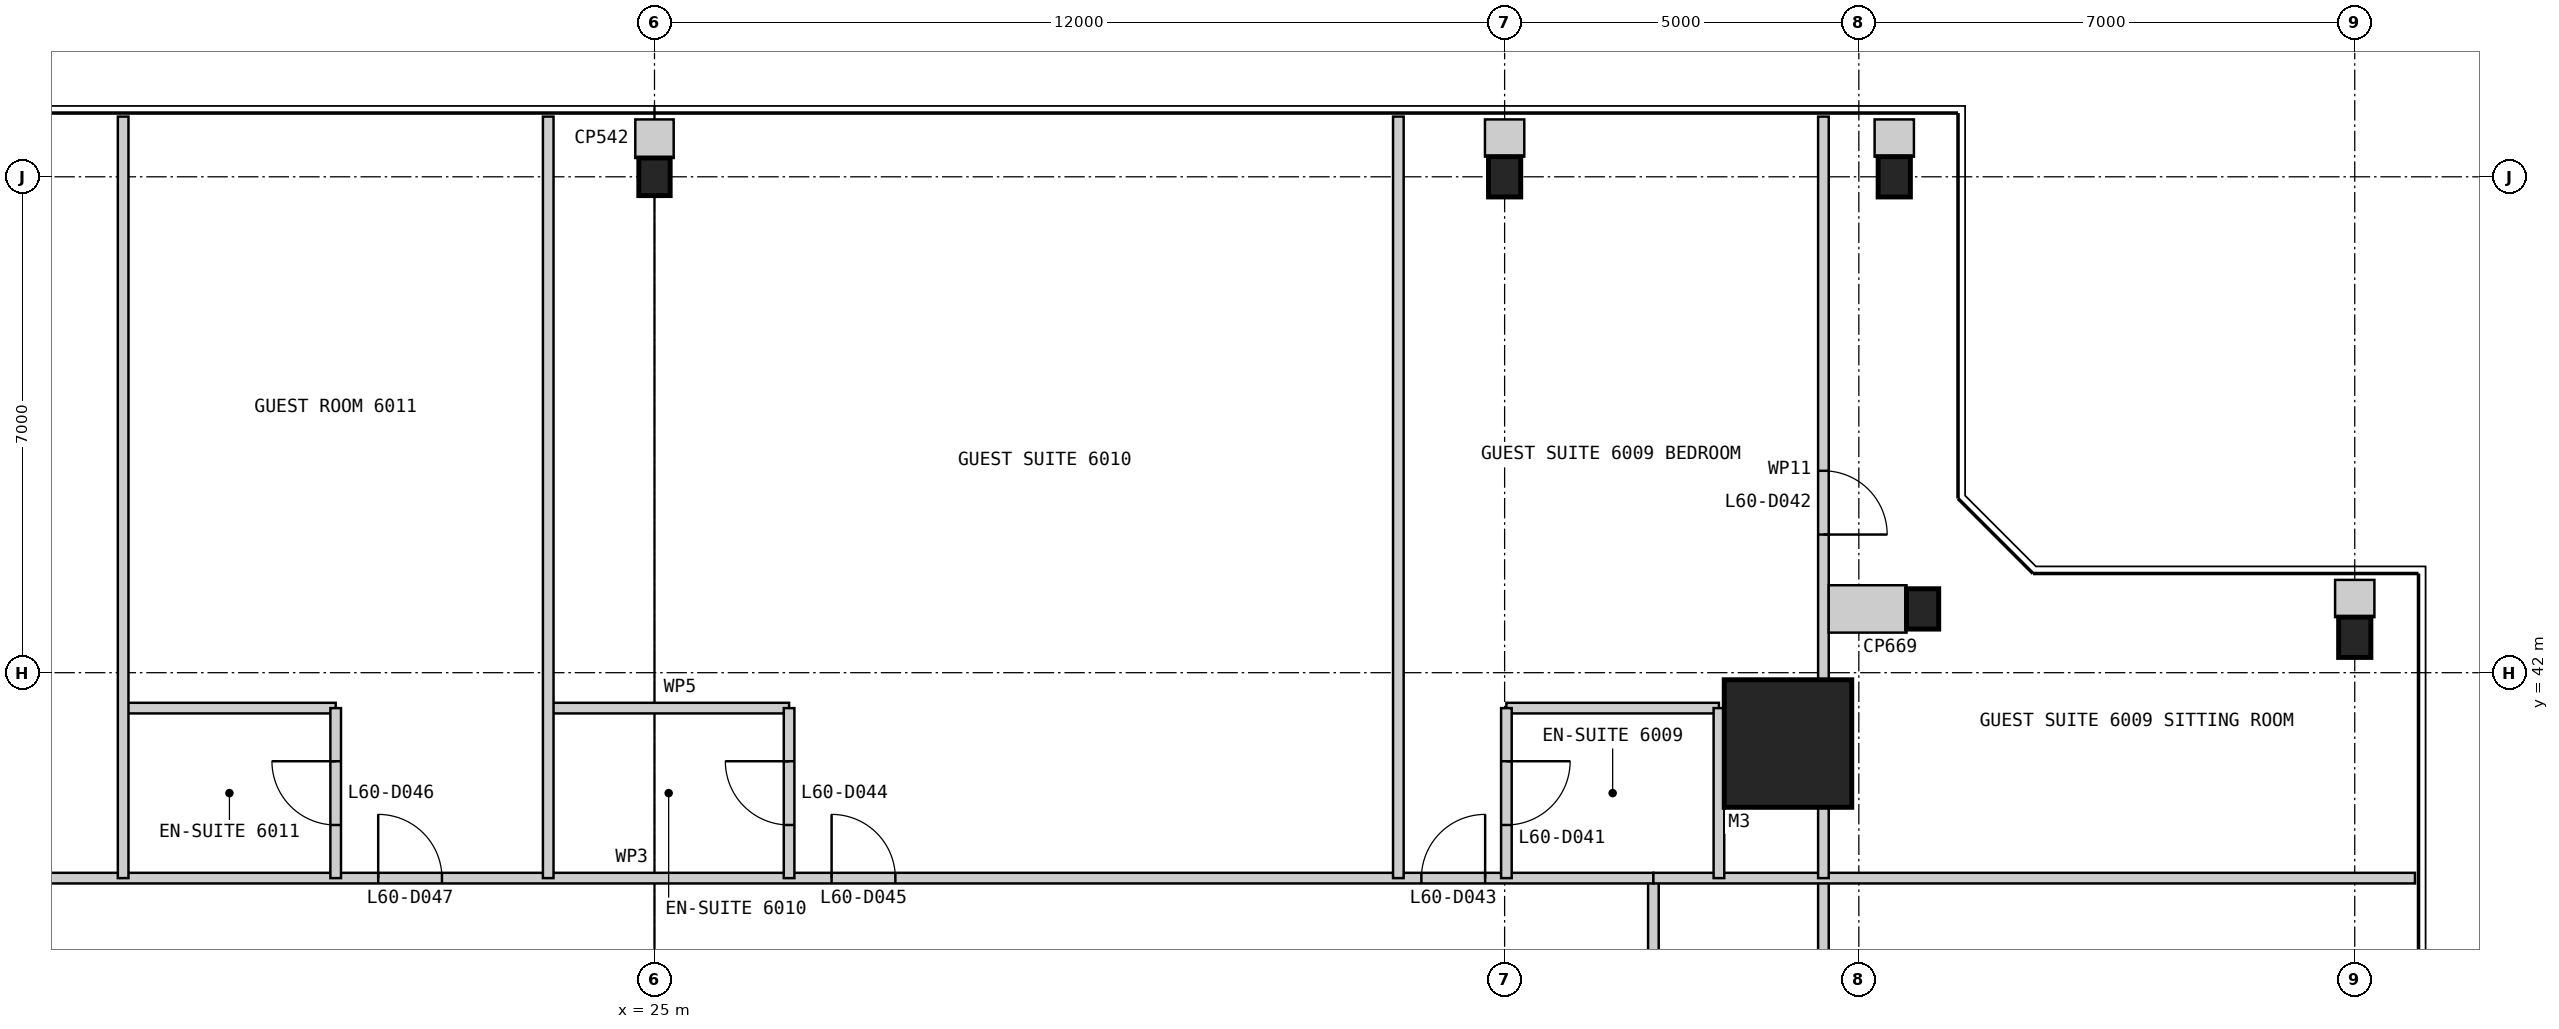
"""IFC4 building model, lengths in metres.
Left out: names, types, materials, properties, quantities, classifications, styles, units other than length and angle.
Written with IfcOpenShell. Run it as: python <this file> out.ifc"""

import sys

from ifc_helpers import new_model, si_unit, direction, frame, frame_2d, origin, origin_2d, place, context, subcontext, project, spatial, rectangle, i_section, extrude, element, fill, save


model = new_model("IFC4")
c1 = context("Model", 3, precision=1e-05, world=origin(), true_north=direction((0.0, 1.0)))
c2 = subcontext(c1, "Body", "Model", "MODEL_VIEW")
j1 = project(units=[si_unit("LENGTHUNIT", "METRE"), si_unit("PLANEANGLEUNIT", "RADIAN")], contexts=[c1])
p1 = place(None, origin())
s1 = spatial("IfcSite", under=j1, at=p1, CompositionType="ELEMENT")
p2 = place(p1, origin())
s2 = spatial("IfcBuilding", under=s1, at=p2, CompositionType="ELEMENT")
p3 = place(p2, frame((0.0, 0.0, 256.0)))
s3 = spatial("IfcBuildingStorey", under=s2, at=p3, CompositionType="ELEMENT", Elevation=256.0)
p4 = place(p3, frame((41.0, 41.0, 0.0), z_axis=(0.0, 0.0, 1.0), x_axis=(1.0, 0.0, 0.0)))
e1 = element("IfcColumn", 1, at=p4, inside=s3, PredefinedType="COLUMN", context=c2, shape_type="SweptSolid", body=[
    extrude(rectangle(XDim=1.8, YDim=1.8, at=origin_2d()), origin(), (0.0, 0.0, 1.0), 3.4),
])
for number, where, z_axis, x_axis in (
    (2, (49.0, 42.5, 0.0), (0.0, 0.0, 1.0), (1.0, 0.0, 0.0)),
    (3, (42.9, 42.9, 0.0), (0.0, 0.0, 1.0), (1.0, 0.0, 0.0)),
    (4, (42.5, 49.0, 0.0), (0.0, 0.0, 1.0), (1.0, 0.0, 0.0)),
    (5, (37.0, 49.0, 0.0), (0.0, 0.0, 1.0), (1.0, 0.0, 0.0)),
):
    element("IfcColumn", number, at=place(p3, frame(where, z_axis=z_axis, x_axis=x_axis)), inside=s3, PredefinedType="COLUMN", context=c2, shape_type="SweptSolid", body=[
        extrude(i_section(OverallWidth=0.455, OverallDepth=0.569, WebThickness=0.078, FlangeThickness=0.125, at=origin_2d()), origin(), (0.0, 0.0, 1.0), 3.4),
    ])
p5 = place(p3, frame((25.0, 49.0, 0.0), z_axis=(0.0, 0.0, 1.0), x_axis=(1.0, 0.0, 0.0)))
e6 = element("IfcColumn", 6, at=p5, inside=s3, PredefinedType="COLUMN", context=c2, shape_type="SweptSolid", body=[
    extrude(i_section(OverallWidth=0.442, OverallDepth=0.531, WebThickness=0.066, FlangeThickness=0.106, at=origin_2d()), origin(), (0.0, 0.0, 1.0), 3.4),
])
p6 = place(p3, frame((39.1, 10.9, 0.0), z_axis=(0.0, 0.0, 1.0), x_axis=(0.0, 1.0, 0.0)))
e7 = element("IfcWall", 7, at=p6, inside=s3, PredefinedType="PARTITIONING", context=c2, shape_type="SweptSolid", body=[
    extrude(rectangle(XDim=28.2, YDim=0.15, at=frame_2d((14.1, 0.0))), origin(), (0.0, 0.0, 1.0), 3.25),
])
p7 = place(p6, frame((2.375, 0.0, 0.0)))
e8 = element("IfcOpeningElement", 8, at=p7, cuts=e7, PredefinedType="OPENING", context=c2, shape_type="SweptSolid", body=[
    extrude(rectangle(XDim=0.9, YDim=2.1, at=frame_2d((0.45, 1.05))), frame((0.0, 0.085, 0.0), z_axis=(0.0, -1.0, 0.0), x_axis=(1.0, 0.0, 0.0)), (0.0, 0.0, 1.0), 0.17),
])
p8 = place(p6, frame((10.7, 0.0, 0.0)))
e9 = element("IfcOpeningElement", 9, at=p8, cuts=e7, PredefinedType="OPENING", context=c2, shape_type="SweptSolid", body=[
    extrude(rectangle(XDim=0.9, YDim=2.1, at=frame_2d((0.45, 1.05))), frame((0.0, 0.085, 0.0), z_axis=(0.0, -1.0, 0.0), x_axis=(1.0, 0.0, 0.0)), (0.0, 0.0, 1.0), 0.17),
])
p9 = place(p6, frame((17.1, 0.0, 0.0)))
e10 = element("IfcOpeningElement", 10, at=p9, cuts=e7, PredefinedType="OPENING", context=c2, shape_type="SweptSolid", body=[
    extrude(rectangle(XDim=0.9, YDim=2.1, at=frame_2d((0.45, 1.05))), frame((0.0, 0.085, 0.0), z_axis=(0.0, -1.0, 0.0), x_axis=(1.0, 0.0, 0.0)), (0.0, 0.0, 1.0), 0.17),
])
p10 = place(p6, frame((23.7, 0.0, 0.0)))
e11 = element("IfcOpeningElement", 11, at=p10, cuts=e7, PredefinedType="OPENING", context=c2, shape_type="SweptSolid", body=[
    extrude(rectangle(XDim=0.9, YDim=2.1, at=frame_2d((0.45, 1.05))), frame((0.0, 0.085, 0.0), z_axis=(0.0, -1.0, 0.0), x_axis=(1.0, 0.0, 0.0)), (0.0, 0.0, 1.0), 0.17),
])
p11 = place(p3, frame((41.5, 36.1, 0.0), z_axis=(0.0, 0.0, 1.0), x_axis=(0.0, 1.0, 0.0)))
e12 = element("IfcWall", 12, at=p11, inside=s3, PredefinedType="PARTITIONING", context=c2, shape_type="SweptSolid", body=[
    extrude(rectangle(XDim=3.0, YDim=0.15, at=frame_2d((1.5, 0.0))), origin(), (0.0, 0.0, 1.0), 3.25),
])
p12 = place(p3, frame((39.1, 39.1, 0.0), z_axis=(0.0, 0.0, 1.0), x_axis=(-1.0, 0.0, 0.0)))
e13 = element("IfcWall", 13, at=p12, inside=s3, PredefinedType="PARTITIONING", context=c2, shape_type="SweptSolid", body=[
    extrude(rectangle(XDim=28.2, YDim=0.15, at=frame_2d((14.1, 0.0))), origin(), (0.0, 0.0, 1.0), 3.25),
])
p13 = place(p12, frame((2.375, 0.0, 0.0)))
e14 = element("IfcOpeningElement", 14, at=p13, cuts=e13, PredefinedType="OPENING", context=c2, shape_type="SweptSolid", body=[
    extrude(rectangle(XDim=0.9, YDim=2.1, at=frame_2d((0.45, 1.05))), frame((0.0, 0.085, 0.0), z_axis=(0.0, -1.0, 0.0), x_axis=(1.0, 0.0, 0.0)), (0.0, 0.0, 1.0), 0.17),
])
p14 = place(p12, frame((10.7, 0.0, 0.0)))
e15 = element("IfcOpeningElement", 15, at=p14, cuts=e13, PredefinedType="OPENING", context=c2, shape_type="SweptSolid", body=[
    extrude(rectangle(XDim=0.9, YDim=2.1, at=frame_2d((0.45, 1.05))), frame((0.0, 0.085, 0.0), z_axis=(0.0, -1.0, 0.0), x_axis=(1.0, 0.0, 0.0)), (0.0, 0.0, 1.0), 0.17),
])
p15 = place(p12, frame((17.1, 0.0, 0.0)))
e16 = element("IfcOpeningElement", 16, at=p15, cuts=e13, PredefinedType="OPENING", context=c2, shape_type="SweptSolid", body=[
    extrude(rectangle(XDim=0.9, YDim=2.1, at=frame_2d((0.45, 1.05))), frame((0.0, 0.085, 0.0), z_axis=(0.0, -1.0, 0.0), x_axis=(1.0, 0.0, 0.0)), (0.0, 0.0, 1.0), 0.17),
])
p16 = place(p12, frame((23.4, 0.0, 0.0)))
e17 = element("IfcOpeningElement", 17, at=p16, cuts=e13, PredefinedType="OPENING", context=c2, shape_type="SweptSolid", body=[
    extrude(rectangle(XDim=1.0, YDim=2.1, at=frame_2d((0.5, 1.05))), frame((0.0, 0.085, 0.0), z_axis=(0.0, -1.0, 0.0), x_axis=(1.0, 0.0, 0.0)), (0.0, 0.0, 1.0), 0.17),
])
p17 = place(p3, frame((49.85, 39.1, 0.0), z_axis=(0.0, 0.0, 1.0), x_axis=(-1.0, 0.0, 0.0)))
e18 = element("IfcWall", 18, at=p17, inside=s3, PredefinedType="PARTITIONING", context=c2, shape_type="SweptSolid", body=[
    extrude(rectangle(XDim=10.75, YDim=0.15, at=frame_2d((5.375, 0.0))), origin(), (0.0, 0.0, 1.0), 3.25),
])
p18 = place(p3, frame((40.025, 41.5, 0.0), z_axis=(0.0, 0.0, 1.0), x_axis=(-1.0, 0.0, 0.0)))
e19 = element("IfcWall", 19, at=p18, inside=s3, PredefinedType="PARTITIONING", context=c2, shape_type="SweptSolid", body=[
    extrude(rectangle(XDim=3.0, YDim=0.15, at=frame_2d((1.5, 0.0))), origin(), (0.0, 0.0, 1.0), 3.25),
])
p19 = place(p3, frame((37.025, 41.5, 0.0), z_axis=(0.0, 0.0, 1.0), x_axis=(0.0, -1.0, 0.0)))
e20 = element("IfcWall", 20, at=p19, inside=s3, PredefinedType="PARTITIONING", context=c2, shape_type="SweptSolid", body=[
    extrude(rectangle(XDim=2.4, YDim=0.15, at=frame_2d((1.2, 0.0))), origin(), (0.0, 0.0, 1.0), 2.628),
])
p20 = place(p19, frame((0.75, 0.0, 0.0)))
e21 = element("IfcOpeningElement", 21, at=p20, cuts=e20, PredefinedType="OPENING", context=c2, shape_type="SweptSolid", body=[
    extrude(rectangle(XDim=0.9, YDim=2.1, at=frame_2d((0.45, 1.05))), frame((0.0, 0.085, 0.0), z_axis=(0.0, -1.0, 0.0), x_axis=(1.0, 0.0, 0.0)), (0.0, 0.0, 1.0), 0.17),
])
p21 = place(p3, frame((40.025, 41.5, 0.0), z_axis=(0.0, 0.0, 1.0), x_axis=(0.0, -1.0, 0.0)))
e22 = element("IfcWall", 22, at=p21, inside=s3, PredefinedType="PARTITIONING", context=c2, shape_type="SweptSolid", body=[
    extrude(rectangle(XDim=2.4, YDim=0.15, at=frame_2d((1.2, 0.0))), origin(), (0.0, 0.0, 1.0), 3.25),
])
p22 = place(p3, frame((41.5, 49.85, 0.0), z_axis=(0.0, 0.0, 1.0), x_axis=(0.0, -1.0, 0.0)))
e23 = element("IfcWall", 23, at=p22, inside=s3, PredefinedType="PARTITIONING", context=c2, shape_type="SweptSolid", body=[
    extrude(rectangle(XDim=10.75, YDim=0.15, at=frame_2d((5.375, 0.0))), origin(), (0.0, 0.0, 1.0), 3.25),
])
p23 = place(p22, frame((5.0, 0.0, 0.0)))
e24 = element("IfcOpeningElement", 24, at=p23, cuts=e23, PredefinedType="OPENING", context=c2, shape_type="SweptSolid", body=[
    extrude(rectangle(XDim=0.9, YDim=2.1, at=frame_2d((0.45, 1.05))), frame((0.0, 0.085, 0.0), z_axis=(0.0, -1.0, 0.0), x_axis=(1.0, 0.0, 0.0)), (0.0, 0.0, 1.0), 0.17),
])
p24 = place(p3, frame((35.5, 49.85, 0.0), z_axis=(0.0, 0.0, 1.0), x_axis=(0.0, -1.0, 0.0)))
e25 = element("IfcWall", 25, at=p24, inside=s3, PredefinedType="PARTITIONING", context=c2, shape_type="SweptSolid", body=[
    extrude(rectangle(XDim=10.75, YDim=0.15, at=frame_2d((5.375, 0.0))), origin(), (0.0, 0.0, 1.0), 3.25),
])
p25 = place(p3, frame((26.9, 41.5, 0.0), z_axis=(0.0, 0.0, 1.0), x_axis=(-1.0, 0.0, 0.0)))
e26 = element("IfcWall", 26, at=p25, inside=s3, PredefinedType="PARTITIONING", context=c2, shape_type="SweptSolid", body=[
    extrude(rectangle(XDim=3.4, YDim=0.15, at=frame_2d((1.7, 0.0))), origin(), (0.0, 0.0, 1.0), 3.25),
])
p26 = place(p3, frame((26.9, 41.5, 0.0), z_axis=(0.0, 0.0, 1.0), x_axis=(0.0, -1.0, 0.0)))
e27 = element("IfcWall", 27, at=p26, inside=s3, PredefinedType="PARTITIONING", context=c2, shape_type="SweptSolid", body=[
    extrude(rectangle(XDim=2.4, YDim=0.15, at=frame_2d((1.2, 0.0))), origin(), (0.0, 0.0, 1.0), 3.25),
])
p27 = place(p26, frame((0.75, 0.0, 0.0)))
e28 = element("IfcOpeningElement", 28, at=p27, cuts=e27, PredefinedType="OPENING", context=c2, shape_type="SweptSolid", body=[
    extrude(rectangle(XDim=0.9, YDim=2.1, at=frame_2d((0.45, 1.05))), frame((0.0, 0.085, 0.0), z_axis=(0.0, -1.0, 0.0), x_axis=(1.0, 0.0, 0.0)), (0.0, 0.0, 1.0), 0.17),
])
p28 = place(p3, frame((23.5, 49.85, 0.0), z_axis=(0.0, 0.0, 1.0), x_axis=(0.0, -1.0, 0.0)))
e29 = element("IfcWall", 29, at=p28, inside=s3, PredefinedType="PARTITIONING", context=c2, shape_type="SweptSolid", body=[
    extrude(rectangle(XDim=10.75, YDim=0.15, at=frame_2d((5.375, 0.0))), origin(), (0.0, 0.0, 1.0), 3.25),
])
p29 = place(p3, frame((20.5, 41.5, 0.0), z_axis=(0.0, 0.0, 1.0), x_axis=(-1.0, 0.0, 0.0)))
e30 = element("IfcWall", 30, at=p29, inside=s3, PredefinedType="PARTITIONING", context=c2, shape_type="SweptSolid", body=[
    extrude(rectangle(XDim=3.0, YDim=0.15, at=frame_2d((1.5, 0.0))), origin(), (0.0, 0.0, 1.0), 3.25),
])
p30 = place(p3, frame((20.5, 41.5, 0.0), z_axis=(0.0, 0.0, 1.0), x_axis=(0.0, -1.0, 0.0)))
e31 = element("IfcWall", 31, at=p30, inside=s3, PredefinedType="PARTITIONING", context=c2, shape_type="SweptSolid", body=[
    extrude(rectangle(XDim=2.4, YDim=0.15, at=frame_2d((1.2, 0.0))), origin(), (0.0, 0.0, 1.0), 3.25),
])
p31 = place(p30, frame((0.75, 0.0, 0.0)))
e32 = element("IfcOpeningElement", 32, at=p31, cuts=e31, PredefinedType="OPENING", context=c2, shape_type="SweptSolid", body=[
    extrude(rectangle(XDim=0.9, YDim=2.1, at=frame_2d((0.45, 1.05))), frame((0.0, 0.085, 0.0), z_axis=(0.0, -1.0, 0.0), x_axis=(1.0, 0.0, 0.0)), (0.0, 0.0, 1.0), 0.17),
])
p32 = place(p3, frame((17.5, 49.85, 0.0), z_axis=(0.0, 0.0, 1.0), x_axis=(0.0, -1.0, 0.0)))
e33 = element("IfcWall", 33, at=p32, inside=s3, PredefinedType="PARTITIONING", context=c2, shape_type="SweptSolid", body=[
    extrude(rectangle(XDim=10.75, YDim=0.15, at=frame_2d((5.375, 0.0))), origin(), (0.0, 0.0, 1.0), 3.25),
])
p33 = place(p3, frame((49.0, 43.31, 0.0), z_axis=(0.0, 0.0, 1.0), x_axis=(0.0, -1.0, 0.0)))
e34 = element("IfcWall", 34, at=p33, inside=s3, PredefinedType="PARTITIONING", context=c2, shape_type="SweptSolid", body=[
    extrude(rectangle(XDim=0.526, YDim=0.555, at=frame_2d((0.263, 0.0))), origin(), (0.0, 0.0, 1.0), 3.25),
])
p34 = place(p3, frame((41.575, 42.9, 0.0), z_axis=(0.0, 0.0, 1.0), x_axis=(1.0, 0.0, 0.0)))
e35 = element("IfcWall", 35, at=p34, inside=s3, PredefinedType="PARTITIONING", context=c2, shape_type="SweptSolid", body=[
    extrude(rectangle(XDim=1.098, YDim=0.669, at=frame_2d((0.549, 0.0))), origin(), (0.0, 0.0, 1.0), 3.25),
])
for number, where, z_axis, x_axis in (
    (36, (42.5, 49.81, 0.0), (0.0, 0.0, 1.0), (0.0, -1.0, 0.0)),
    (37, (37.0, 49.81, 0.0), (0.0, 0.0, 1.0), (0.0, -1.0, 0.0)),
):
    element("IfcWall", number, at=place(p3, frame(where, z_axis=z_axis, x_axis=x_axis)), inside=s3, PredefinedType="PARTITIONING", context=c2, shape_type="SweptSolid", body=[
        extrude(rectangle(XDim=0.526, YDim=0.555, at=frame_2d((0.263, 0.0))), origin(), (0.0, 0.0, 1.0), 3.25),
    ])
p35 = place(p3, frame((25.0, 49.81, 0.0), z_axis=(0.0, 0.0, 1.0), x_axis=(0.0, -1.0, 0.0)))
e38 = element("IfcWall", 38, at=p35, inside=s3, PredefinedType="PARTITIONING", context=c2, shape_type="SweptSolid", body=[
    extrude(rectangle(XDim=0.545, YDim=0.542, at=frame_2d((0.272, 0.0))), origin(), (0.0, 0.0, 1.0), 3.25),
])
p36 = place(p20, origin())
e39 = element("IfcDoor", 39, at=p36, inside=s3, OperationType="SINGLE_SWING_LEFT", PredefinedType="DOOR", context=c2, shape_type="SweptSolid", body=[
    extrude(rectangle(XDim=0.9, YDim=2.1, at=frame_2d((0.45, 1.05))), frame((0.0, 0.025, 0.0), z_axis=(0.0, -1.0, 0.0), x_axis=(1.0, 0.0, 0.0)), (0.0, 0.0, 1.0), 0.05),
])
fill(e21, e39)
p37 = place(p23, origin())
e40 = element("IfcDoor", 40, at=p37, inside=s3, OperationType="SINGLE_SWING_RIGHT", PredefinedType="DOOR", context=c2, shape_type="SweptSolid", body=[
    extrude(rectangle(XDim=0.9, YDim=2.1, at=frame_2d((0.45, 1.05))), frame((0.0, 0.025, 0.0), z_axis=(0.0, -1.0, 0.0), x_axis=(1.0, 0.0, 0.0)), (0.0, 0.0, 1.0), 0.05),
])
fill(e24, e40)
p38 = place(p13, frame((0.9, 0.0, 0.0), z_axis=(0.0, 0.0, 1.0), x_axis=(-1.0, 0.0, 0.0)))
e41 = element("IfcDoor", 41, at=p38, inside=s3, OperationType="SINGLE_SWING_RIGHT", PredefinedType="DOOR", context=c2, shape_type="SweptSolid", body=[
    extrude(rectangle(XDim=0.9, YDim=2.1, at=frame_2d((0.45, 1.05))), frame((0.0, 0.025, 0.0), z_axis=(0.0, -1.0, 0.0), x_axis=(1.0, 0.0, 0.0)), (0.0, 0.0, 1.0), 0.05),
])
fill(e14, e41)
p39 = place(p27, frame((0.9, 0.0, 0.0), z_axis=(0.0, 0.0, 1.0), x_axis=(-1.0, 0.0, 0.0)))
e42 = element("IfcDoor", 42, at=p39, inside=s3, OperationType="SINGLE_SWING_RIGHT", PredefinedType="DOOR", context=c2, shape_type="SweptSolid", body=[
    extrude(rectangle(XDim=0.9, YDim=2.1, at=frame_2d((0.45, 1.05))), frame((0.0, 0.025, 0.0), z_axis=(0.0, -1.0, 0.0), x_axis=(1.0, 0.0, 0.0)), (0.0, 0.0, 1.0), 0.05),
])
fill(e28, e42)
p40 = place(p14, frame((0.9, 0.0, 0.0), z_axis=(0.0, 0.0, 1.0), x_axis=(-1.0, 0.0, 0.0)))
e43 = element("IfcDoor", 43, at=p40, inside=s3, OperationType="SINGLE_SWING_LEFT", PredefinedType="DOOR", context=c2, shape_type="SweptSolid", body=[
    extrude(rectangle(XDim=0.9, YDim=2.1, at=frame_2d((0.45, 1.05))), frame((0.0, 0.025, 0.0), z_axis=(0.0, -1.0, 0.0), x_axis=(1.0, 0.0, 0.0)), (0.0, 0.0, 1.0), 0.05),
])
fill(e15, e43)
p41 = place(p31, frame((0.9, 0.0, 0.0), z_axis=(0.0, 0.0, 1.0), x_axis=(-1.0, 0.0, 0.0)))
e44 = element("IfcDoor", 44, at=p41, inside=s3, OperationType="SINGLE_SWING_RIGHT", PredefinedType="DOOR", context=c2, shape_type="SweptSolid", body=[
    extrude(rectangle(XDim=0.9, YDim=2.1, at=frame_2d((0.45, 1.05))), frame((0.0, 0.025, 0.0), z_axis=(0.0, -1.0, 0.0), x_axis=(1.0, 0.0, 0.0)), (0.0, 0.0, 1.0), 0.05),
])
fill(e32, e44)
p42 = place(p15, frame((0.9, 0.0, 0.0), z_axis=(0.0, 0.0, 1.0), x_axis=(-1.0, 0.0, 0.0)))
e45 = element("IfcDoor", 45, at=p42, inside=s3, OperationType="SINGLE_SWING_LEFT", PredefinedType="DOOR", context=c2, shape_type="SweptSolid", body=[
    extrude(rectangle(XDim=0.9, YDim=2.1, at=frame_2d((0.45, 1.05))), frame((0.0, 0.025, 0.0), z_axis=(0.0, -1.0, 0.0), x_axis=(1.0, 0.0, 0.0)), (0.0, 0.0, 1.0), 0.05),
])
fill(e16, e45)
save(model, sys.argv[1])
